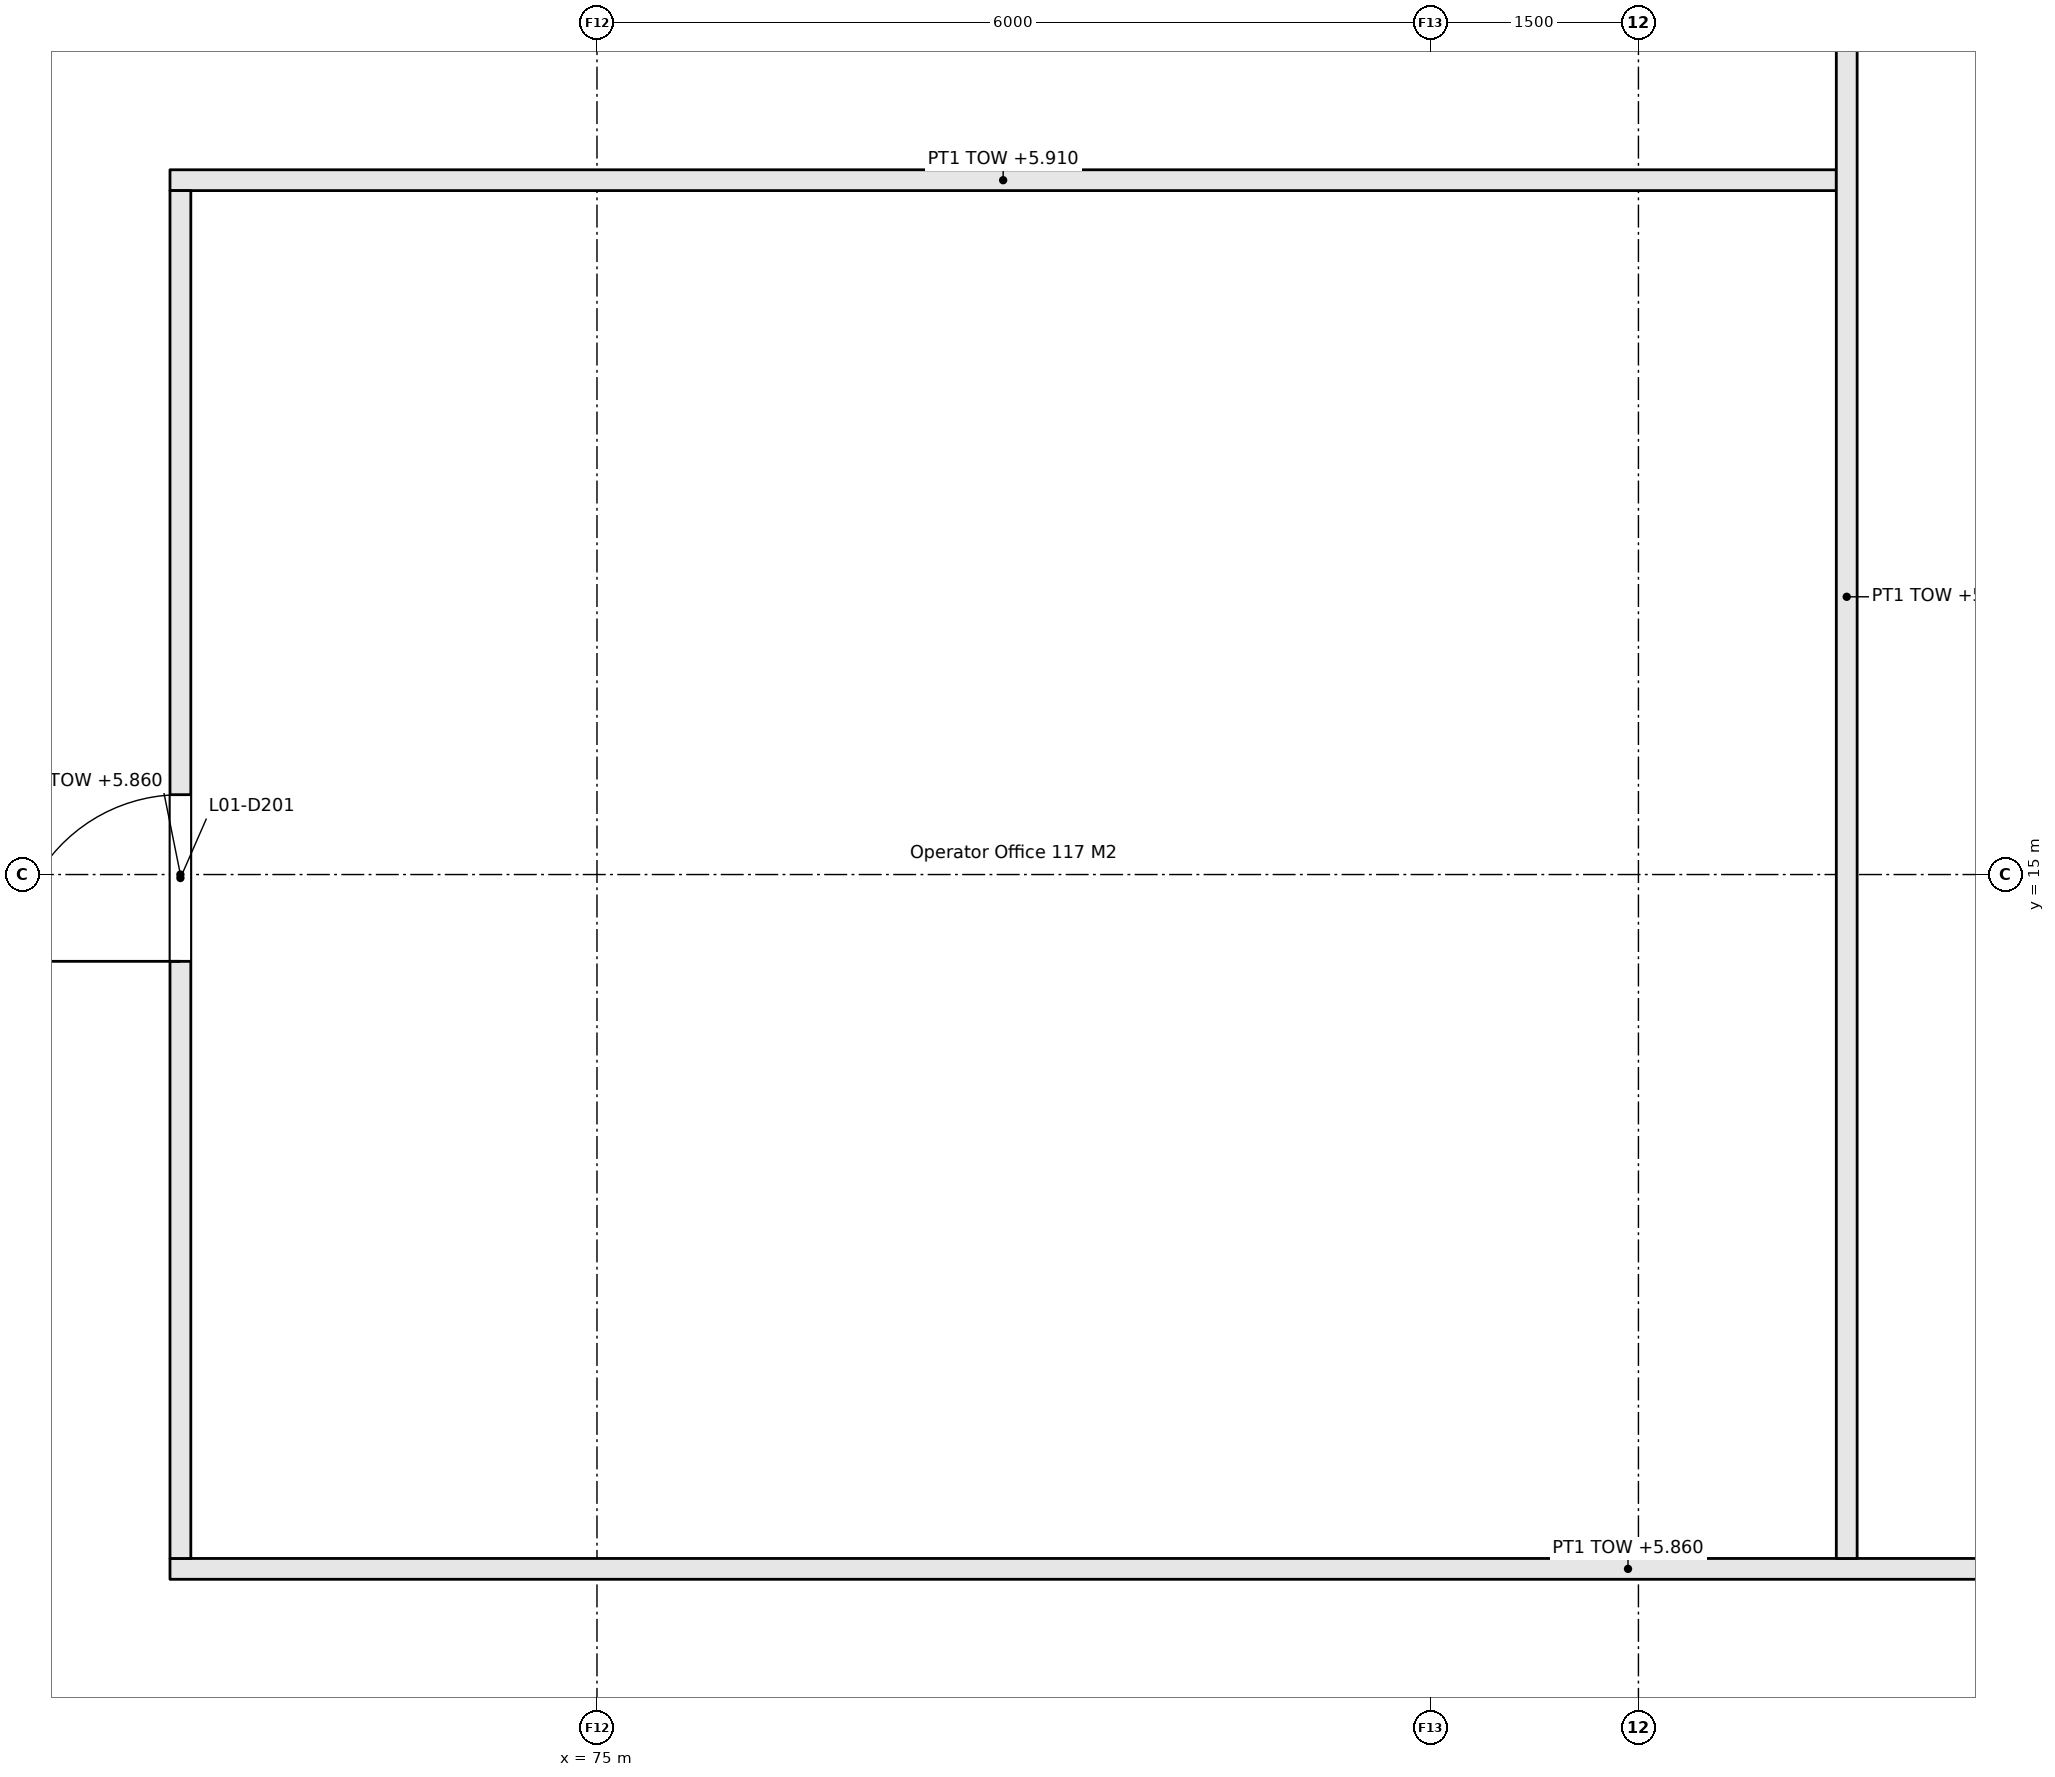
"""IFC4 building model, lengths in metres.
Left out: names, types, materials, properties, quantities, classifications, styles, units other than length and angle.
Written with IfcOpenShell. Run it as: python <this file> out.ifc"""

import sys

from ifc_helpers import new_model, si_unit, direction, frame, frame_2d, origin, place, context, subcontext, project, spatial, rectangle, extrude, element, fill, save


model = new_model("IFC4")
c1 = context("Model", 3, precision=1e-05, world=origin(), true_north=direction((0.0, 1.0)))
c2 = subcontext(c1, "Body", "Model", "MODEL_VIEW")
j1 = project(units=[si_unit("LENGTHUNIT", "METRE"), si_unit("PLANEANGLEUNIT", "RADIAN")], contexts=[c1])
p1 = place(None, origin())
s1 = spatial("IfcSite", under=j1, at=p1, CompositionType="ELEMENT")
p2 = place(p1, origin())
s2 = spatial("IfcBuilding", under=s1, at=p2, CompositionType="ELEMENT")
p3 = place(p2, frame((0.0, 0.0, 3.3)))
s3 = spatial("IfcBuildingStorey", under=s2, at=p3, CompositionType="ELEMENT", Elevation=3.3)
p4 = place(p3, frame((71.925, 10.0, 0.0), z_axis=(0.0, 0.0, 1.0), x_axis=(1.0, 0.0, 0.0)))
e1 = element("IfcWall", 1, at=p4, inside=s3, PredefinedType="PARTITIONING", context=c2, shape_type="SweptSolid", body=[
    extrude(rectangle(XDim=21.0, YDim=0.15, at=frame_2d((10.5, 0.0))), origin(), (0.0, 0.0, 1.0), 2.56),
])
p5 = place(p4, frame((15.838, 0.0, 0.0)))
e2 = element("IfcOpeningElement", 2, at=p5, cuts=e1, PredefinedType="OPENING", context=c2, shape_type="SweptSolid", body=[
    extrude(rectangle(XDim=1.2, YDim=2.1, at=frame_2d((0.6, 1.05))), frame((0.0, 0.085, 0.0), z_axis=(0.0, -1.0, 0.0), x_axis=(1.0, 0.0, 0.0)), (0.0, 0.0, 1.0), 0.17),
])
p6 = place(p3, frame((71.925, 20.0, 0.0), z_axis=(0.0, 0.0, 1.0), x_axis=(1.0, 0.0, 0.0)))
e3 = element("IfcWall", 3, at=p6, inside=s3, PredefinedType="PARTITIONING", context=c2, shape_type="SweptSolid", body=[
    extrude(rectangle(XDim=12.0, YDim=0.15, at=frame_2d((6.0, 0.0))), origin(), (0.0, 0.0, 1.0), 2.61),
])
p7 = place(p3, frame((72.0, 10.075, 0.0), z_axis=(0.0, 0.0, 1.0), x_axis=(0.0, 1.0, 0.0)))
e4 = element("IfcWall", 4, at=p7, inside=s3, PredefinedType="PARTITIONING", context=c2, shape_type="SweptSolid", body=[
    extrude(rectangle(XDim=9.85, YDim=0.15, at=frame_2d((4.925, 0.0))), origin(), (0.0, 0.0, 1.0), 2.56),
])
p8 = place(p7, frame((4.3, 0.0, 0.0)))
e5 = element("IfcOpeningElement", 5, at=p8, cuts=e4, PredefinedType="OPENING", context=c2, shape_type="SweptSolid", body=[
    extrude(rectangle(XDim=1.2, YDim=2.1, at=frame_2d((0.6, 1.05))), frame((0.0, 0.085, 0.0), z_axis=(0.0, -1.0, 0.0), x_axis=(1.0, 0.0, 0.0)), (0.0, 0.0, 1.0), 0.17),
])
p9 = place(p3, frame((84.0, 10.075, 0.0), z_axis=(0.0, 0.0, 1.0), x_axis=(0.0, 1.0, 0.0)))
e6 = element("IfcWall", 6, at=p9, inside=s3, PredefinedType="PARTITIONING", context=c2, shape_type="SweptSolid", body=[
    extrude(rectangle(XDim=13.85, YDim=0.15, at=frame_2d((6.925, 0.0))), origin(), (0.0, 0.0, 1.0), 2.56),
])
p10 = place(p8, origin())
e7 = element("IfcDoor", 7, at=p10, inside=s3, OperationType="DOUBLE_DOOR_SINGLE_SWING", PredefinedType="DOOR", context=c2, shape_type="SweptSolid", body=[
    extrude(rectangle(XDim=1.2, YDim=2.1, at=frame_2d((0.6, 1.05))), frame((0.0, 0.025, 0.0), z_axis=(0.0, -1.0, 0.0), x_axis=(1.0, 0.0, 0.0)), (0.0, 0.0, 1.0), 0.05),
])
fill(e5, e7)
save(model, sys.argv[1])
